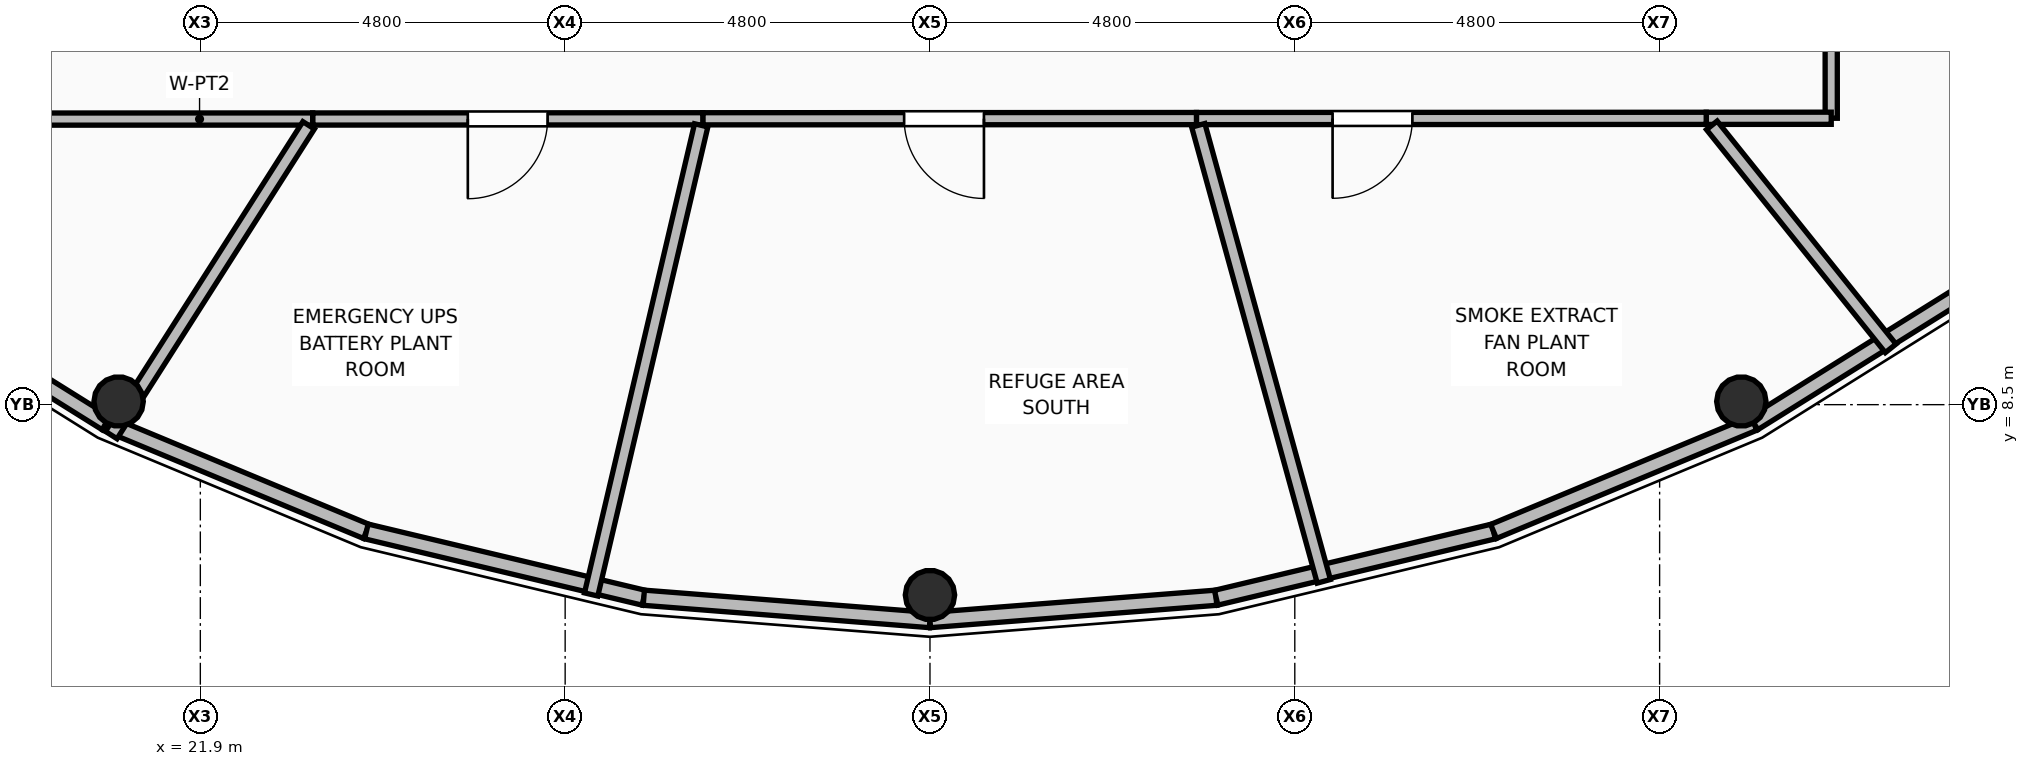
"""IFC4 building model, lengths in metres.
Left out: names, types, materials, properties, quantities, classifications, styles, units other than length and angle.
Written with IfcOpenShell. Run it as: python <this file> out.ifc"""

import sys

from ifc_helpers import new_model, si_unit, direction, frame, frame_2d, origin, origin_2d, place, context, subcontext, project, spatial, rectangle, hollow_circle, extrude, element, fill, save


model = new_model("IFC4")
c1 = context("Model", 3, precision=1e-05, world=origin(), true_north=direction((0.0, 1.0)))
c2 = subcontext(c1, "Body", "Model", "MODEL_VIEW")
j1 = project(units=[si_unit("LENGTHUNIT", "METRE"), si_unit("PLANEANGLEUNIT", "RADIAN")], contexts=[c1])
p1 = place(None, origin())
s1 = spatial("IfcSite", under=j1, at=p1, CompositionType="ELEMENT")
p2 = place(p1, origin())
s2 = spatial("IfcBuilding", under=s1, at=p2, CompositionType="ELEMENT")
p3 = place(p2, frame((0.0, 0.0, 253.65)))
s3 = spatial("IfcBuildingStorey", under=s2, at=p3, CompositionType="ELEMENT", Elevation=253.65)
p4 = place(p3, frame((20.825, 8.542, 0.0), z_axis=(0.130171994019, 0.201410172818, 0.970818826691), x_axis=(-0.839859571413, 0.542803740136, 0.0)))
e1 = element("IfcColumn", 1, at=p4, inside=s3, PredefinedType="COLUMN", context=c2, shape_type="SweptSolid", body=[
    extrude(hollow_circle(Radius=0.325, WallThickness=0.03, at=origin_2d()), origin(), (0.0, 0.0, 1.0), 5.377),
])
p5 = place(p3, frame((31.5, 5.996, 0.0), z_axis=(0.0, 0.232870617918, 0.972507725065), x_axis=(-1.0, 0.0, 0.0)))
e2 = element("IfcColumn", 2, at=p5, inside=s3, PredefinedType="COLUMN", context=c2, shape_type="SweptSolid", body=[
    extrude(hollow_circle(Radius=0.325, WallThickness=0.03, at=origin_2d()), origin(), (0.0, 0.0, 1.0), 5.368),
])
p6 = place(p3, frame((42.175, 8.542, 0.0), z_axis=(-0.130171994019, 0.201410172818, 0.970818826691), x_axis=(-0.839859571413, -0.542803740136, 0.0)))
e3 = element("IfcColumn", 3, at=p6, inside=s3, PredefinedType="COLUMN", context=c2, shape_type="SweptSolid", body=[
    extrude(hollow_circle(Radius=0.325, WallThickness=0.03, at=origin_2d()), origin(), (0.0, 0.0, 1.0), 5.377),
])
p7 = place(p3, frame((17.564, 10.189, 0.0), z_axis=(0.0, 0.0, 1.0), x_axis=(0.84825750298, -0.529583995828, 0.0)))
e4 = element("IfcWall", 4, at=p7, inside=s3, PredefinedType="PARAPET", context=c2, shape_type="SweptSolid", body=[
    extrude(rectangle(XDim=3.65, YDim=0.2, at=frame_2d((1.825, 0.0))), origin(), (0.0, 0.0, 1.0), 1.12),
])
p8 = place(p3, frame((20.66, 8.256, 0.0), z_axis=(0.0, 0.0, 1.0), x_axis=(0.92336680677, -0.383918923935, 0.0)))
e5 = element("IfcWall", 5, at=p8, inside=s3, PredefinedType="PARAPET", context=c2, shape_type="SweptSolid", body=[
    extrude(rectangle(XDim=3.709, YDim=0.2, at=frame_2d((1.854, 0.0))), origin(), (0.0, 0.0, 1.0), 1.12),
])
p9 = place(p3, frame((24.085, 6.832, 0.0), z_axis=(0.0, 0.0, 1.0), x_axis=(0.972626535049, -0.23237388691, 0.0)))
e6 = element("IfcWall", 6, at=p9, inside=s3, PredefinedType="PARAPET", context=c2, shape_type="SweptSolid", body=[
    extrude(rectangle(XDim=3.753, YDim=0.2, at=frame_2d((1.876, 0.0))), origin(), (0.0, 0.0, 1.0), 1.12),
])
for number, where, z_axis, x_axis in (
    (7, (27.735, 5.96, 0.0), (0.0, 0.0, 1.0), (0.997, -0.078, 0.0)),
    (8, (31.5, 5.666, 0.0), (0.0, 0.0, 1.0), (0.997, 0.078, 0.0)),
):
    element("IfcWall", number, at=place(p3, frame(where, z_axis=z_axis, x_axis=x_axis)), inside=s3, PredefinedType="PARAPET", context=c2, shape_type="SweptSolid", body=[
        extrude(rectangle(XDim=3.776, YDim=0.2, at=frame_2d((1.888, 0.0))), origin(), (0.0, 0.0, 1.0), 1.12),
    ])
p10 = place(p3, frame((35.265, 5.96, 0.0), z_axis=(0.0, 0.0, 1.0), x_axis=(0.972626535049, 0.23237388691, 0.0)))
e9 = element("IfcWall", 9, at=p10, inside=s3, PredefinedType="PARAPET", context=c2, shape_type="SweptSolid", body=[
    extrude(rectangle(XDim=3.753, YDim=0.2, at=frame_2d((1.876, 0.0))), origin(), (0.0, 0.0, 1.0), 1.12),
])
p11 = place(p3, frame((38.915, 6.832, 0.0), z_axis=(0.0, 0.0, 1.0), x_axis=(0.92336680677, 0.383918923935, 0.0)))
e10 = element("IfcWall", 10, at=p11, inside=s3, PredefinedType="PARAPET", context=c2, shape_type="SweptSolid", body=[
    extrude(rectangle(XDim=3.709, YDim=0.2, at=frame_2d((1.854, 0.0))), origin(), (0.0, 0.0, 1.0), 1.12),
])
p12 = place(p3, frame((42.34, 8.256, 0.0), z_axis=(0.0, 0.0, 1.0), x_axis=(0.84825750298, 0.529583995828, 0.0)))
e11 = element("IfcWall", 11, at=p12, inside=s3, PredefinedType="PARAPET", context=c2, shape_type="SweptSolid", body=[
    extrude(rectangle(XDim=3.65, YDim=0.2, at=frame_2d((1.825, 0.0))), origin(), (0.0, 0.0, 1.0), 1.12),
])
p13 = place(p3, frame((43.355, 19.291, 0.0), z_axis=(0.0, 0.0, 1.0), x_axis=(0.00041715911, -0.999999912989, 0.0)))
e12 = element("IfcWall", 12, at=p13, inside=s3, PredefinedType="PARTITIONING", context=c2, shape_type="SweptSolid", body=[
    extrude(rectangle(XDim=7.023, YDim=0.16, at=frame_2d((3.511, 0.0))), origin(), (0.0, 0.0, 1.0), 4.733),
])
p14 = place(p13, frame((3.433, 0.0, 0.0)))
e13 = element("IfcOpeningElement", 13, at=p14, cuts=e12, PredefinedType="OPENING", context=c2, shape_type="SweptSolid", body=[
    extrude(rectangle(XDim=1.05, YDim=2.1, at=frame_2d((0.525, 1.05))), frame((0.0, 0.09, 0.0), z_axis=(0.0, -1.0, 0.0), x_axis=(1.0, 0.0, 0.0)), (0.0, 0.0, 1.0), 0.18),
])
p15 = place(p3, frame((43.358, 12.268, 0.0), z_axis=(0.0, 0.0, 1.0), x_axis=(-0.999999823791, -0.000593647862, 0.0)))
e14 = element("IfcWall", 14, at=p15, inside=s3, PredefinedType="PARTITIONING", context=c2, shape_type="SweptSolid", body=[
    extrude(rectangle(XDim=1.645, YDim=0.16, at=frame_2d((0.823, 0.0))), origin(), (0.0, 0.0, 1.0), 5.2),
])
p16 = place(p3, frame((41.713, 12.267, 0.0), z_axis=(0.0, 0.0, 1.0), x_axis=(-0.999999888028, -0.000473226258, 0.0)))
e15 = element("IfcWall", 15, at=p16, inside=s3, PredefinedType="PARTITIONING", context=c2, shape_type="SweptSolid", body=[
    extrude(rectangle(XDim=6.707, YDim=0.16, at=frame_2d((3.354, 0.0))), origin(), (0.0, 0.0, 1.0), 4.733),
])
p17 = place(p16, frame((3.866, 0.0, 0.0)))
e16 = element("IfcOpeningElement", 16, at=p17, cuts=e15, PredefinedType="OPENING", context=c2, shape_type="SweptSolid", body=[
    extrude(rectangle(XDim=1.05, YDim=2.1, at=frame_2d((0.525, 1.05))), frame((0.0, 0.09, 0.0), z_axis=(0.0, -1.0, 0.0), x_axis=(1.0, 0.0, 0.0)), (0.0, 0.0, 1.0), 0.18),
])
p18 = place(p3, frame((35.006, 12.264, 0.0), z_axis=(0.0, 0.0, 1.0), x_axis=(-0.999999898272, -0.000451059945, 0.0)))
e17 = element("IfcWall", 17, at=p18, inside=s3, PredefinedType="PARTITIONING", context=c2, shape_type="SweptSolid", body=[
    extrude(rectangle(XDim=6.495, YDim=0.16, at=frame_2d((3.248, 0.0))), origin(), (0.0, 0.0, 1.0), 4.733),
])
p19 = place(p18, frame((2.796, 0.0, 0.0)))
e18 = element("IfcOpeningElement", 18, at=p19, cuts=e17, PredefinedType="OPENING", context=c2, shape_type="SweptSolid", body=[
    extrude(rectangle(XDim=1.05, YDim=2.1, at=frame_2d((0.525, 1.05))), frame((0.0, 0.09, 0.0), z_axis=(0.0, -1.0, 0.0), x_axis=(1.0, 0.0, 0.0)), (0.0, 0.0, 1.0), 0.18),
])
p20 = place(p3, frame((28.511, 12.261, 0.0), z_axis=(0.0, 0.0, 1.0), x_axis=(-0.999999837123, -0.000570749015, 0.0)))
e19 = element("IfcWall", 19, at=p20, inside=s3, PredefinedType="PARTITIONING", context=c2, shape_type="SweptSolid", body=[
    extrude(rectangle(XDim=5.133, YDim=0.16, at=frame_2d((2.566, 0.0))), origin(), (0.0, 0.0, 1.0), 5.2),
])
p21 = place(p20, frame((2.042, 0.0, 0.0)))
e20 = element("IfcOpeningElement", 20, at=p21, cuts=e19, PredefinedType="OPENING", context=c2, shape_type="SweptSolid", body=[
    extrude(rectangle(XDim=1.05, YDim=2.1, at=frame_2d((0.525, 1.05))), frame((0.0, 0.09, 0.0), z_axis=(0.0, -1.0, 0.0), x_axis=(1.0, 0.0, 0.0)), (0.0, 0.0, 1.0), 0.18),
])
p22 = place(p3, frame((23.378, 12.258, 0.0), z_axis=(0.0, 0.0, 1.0), x_axis=(-0.999999965632, -0.00026217473, 0.0)))
e21 = element("IfcWall", 21, at=p22, inside=s3, PredefinedType="PARTITIONING", context=c2, shape_type="SweptSolid", body=[
    extrude(rectangle(XDim=3.725, YDim=0.16, at=frame_2d((1.862, 0.0))), origin(), (0.0, 0.0, 1.0), 4.733),
])
p23 = place(p3, frame((23.325, 12.175, 0.0), z_axis=(0.0, 0.0, 1.0), x_axis=(-0.537431147311, -0.843307631829, 0.0)))
e22 = element("IfcWall", 22, at=p23, inside=s3, PredefinedType="PARTITIONING", context=c2, shape_type="SweptSolid", body=[
    extrude(rectangle(XDim=4.832, YDim=0.18, at=frame_2d((2.416, 0.0))), origin(), (0.0, 0.0, 1.0), 4.575),
])
p24 = place(p3, frame((28.49, 12.175, 0.0), z_axis=(0.0, 0.0, 1.0), x_axis=(-0.22840178913, -0.97356695852, 0.0)))
e23 = element("IfcWall", 23, at=p24, inside=s3, PredefinedType="PARTITIONING", context=c2, shape_type="SweptSolid", body=[
    extrude(rectangle(XDim=6.34, YDim=0.18, at=frame_2d((3.17, 0.0))), origin(), (0.0, 0.0, 1.0), 4.575),
])
p25 = place(p3, frame((35.03, 12.175, 0.0), z_axis=(0.0, 0.0, 1.0), x_axis=(0.265473825657, -0.964118067402, 0.0)))
e24 = element("IfcWall", 24, at=p25, inside=s3, PredefinedType="PARTITIONING", context=c2, shape_type="SweptSolid", body=[
    extrude(rectangle(XDim=6.222, YDim=0.18, at=frame_2d((3.111, 0.0))), origin(), (0.0, 0.0, 1.0), 4.575),
])
p26 = place(p3, frame((41.787, 12.175, 0.0), z_axis=(0.0, 0.0, 1.0), x_axis=(0.625589202781, -0.780152644912, 0.0)))
e25 = element("IfcWall", 25, at=p26, inside=s3, PredefinedType="PARTITIONING", context=c2, shape_type="SweptSolid", body=[
    extrude(rectangle(XDim=3.761, YDim=0.18, at=frame_2d((1.88, 0.0))), origin(), (0.0, 0.0, 1.0), 4.575),
])
p27 = place(p21, origin())
e26 = element("IfcDoor", 26, at=p27, inside=s3, OperationType="SINGLE_SWING_RIGHT", PredefinedType="DOOR", context=c2, shape_type="SweptSolid", body=[
    extrude(rectangle(XDim=1.05, YDim=2.1, at=frame_2d((0.525, 1.05))), frame((0.0, 0.025, 0.0), z_axis=(0.0, -1.0, 0.0), x_axis=(1.0, 0.0, 0.0)), (0.0, 0.0, 1.0), 0.05),
])
fill(e20, e26)
p28 = place(p19, origin())
e27 = element("IfcDoor", 27, at=p28, inside=s3, OperationType="SINGLE_SWING_LEFT", PredefinedType="DOOR", context=c2, shape_type="SweptSolid", body=[
    extrude(rectangle(XDim=1.05, YDim=2.1, at=frame_2d((0.525, 1.05))), frame((0.0, 0.025, 0.0), z_axis=(0.0, -1.0, 0.0), x_axis=(1.0, 0.0, 0.0)), (0.0, 0.0, 1.0), 0.05),
])
fill(e18, e27)
p29 = place(p17, origin())
e28 = element("IfcDoor", 28, at=p29, inside=s3, OperationType="SINGLE_SWING_RIGHT", PredefinedType="DOOR", context=c2, shape_type="SweptSolid", body=[
    extrude(rectangle(XDim=1.05, YDim=2.1, at=frame_2d((0.525, 1.05))), frame((0.0, 0.025, 0.0), z_axis=(0.0, -1.0, 0.0), x_axis=(1.0, 0.0, 0.0)), (0.0, 0.0, 1.0), 0.05),
])
fill(e16, e28)
save(model, sys.argv[1])
